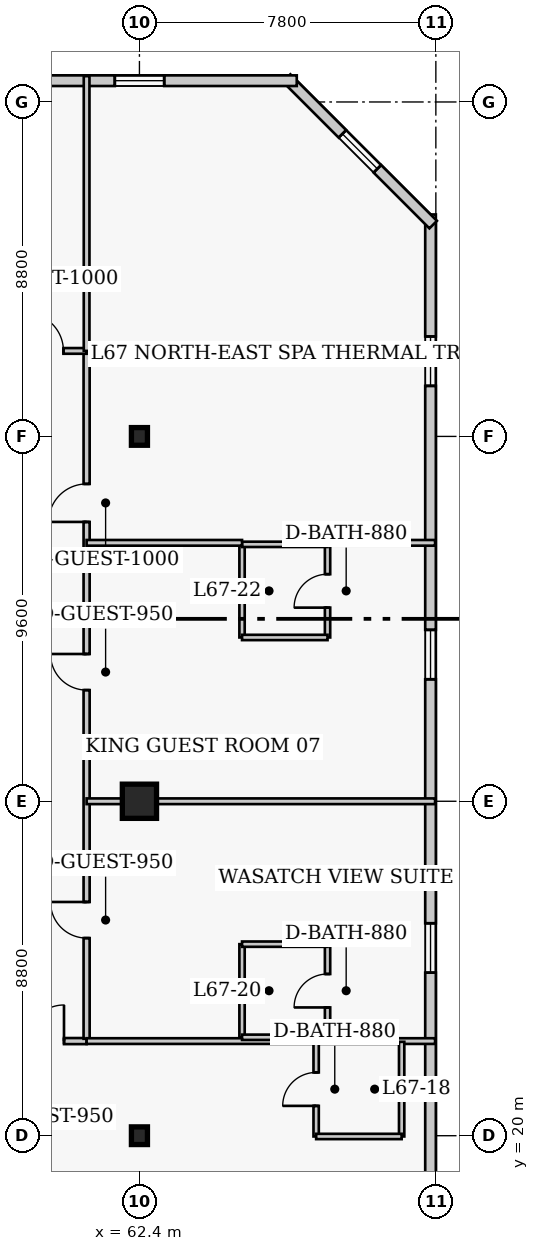
"""IFC4 building model, lengths in metres.
Left out: names, types, materials, properties, quantities, classifications, styles, units other than length and angle.
Written with IfcOpenShell. Run it as: python <this file> out.ifc"""

import sys

from ifc_helpers import new_model, si_unit, direction, frame, frame_2d, origin, origin_2d, place, context, subcontext, project, spatial, rectangle, i_section, extrude, element, fill, save


model = new_model("IFC4")
c1 = context("Model", 3, precision=1e-05, world=origin(), true_north=direction((0.0, 1.0)))
c2 = subcontext(c1, "Body", "Model", "MODEL_VIEW")
j1 = project(units=[si_unit("LENGTHUNIT", "METRE"), si_unit("PLANEANGLEUNIT", "RADIAN")], contexts=[c1])
p1 = place(None, origin())
s1 = spatial("IfcSite", under=j1, at=p1, CompositionType="ELEMENT")
p2 = place(p1, origin())
s2 = spatial("IfcBuilding", under=s1, at=p2, CompositionType="ELEMENT")
p3 = place(p2, frame((0.0, 0.0, 269.4)))
s3 = spatial("IfcBuildingStorey", under=s2, at=p3, CompositionType="ELEMENT", Elevation=269.4)
p4 = place(p3, frame((62.4, 20.0, 0.0), z_axis=(0.0, 0.0, 1.0), x_axis=(1.0, 0.0, 0.0)))
e1 = element("IfcColumn", 1, at=p4, inside=s3, PredefinedType="COLUMN", context=c2, shape_type="SweptSolid", body=[
    extrude(i_section(OverallWidth=0.422, OverallDepth=0.465, WebThickness=0.045, FlangeThickness=0.073, FilletRadius=0.017, at=origin_2d()), origin(), (0.0, 0.0, 1.0), 4.0),
])
p5 = place(p3, frame((62.4, 28.8, 0.0), z_axis=(0.0, 0.0, 1.0), x_axis=(1.0, 0.0, 0.0)))
e2 = element("IfcColumn", 2, at=p5, inside=s3, PredefinedType="COLUMN", context=c2, shape_type="SweptSolid", body=[
    extrude(rectangle(XDim=0.9, YDim=0.9, at=origin_2d()), origin(), (0.0, 0.0, 1.0), 4.0),
])
p6 = place(p3, frame((62.4, 38.4, 0.0), z_axis=(0.0, 0.0, 1.0), x_axis=(1.0, 0.0, 0.0)))
e3 = element("IfcColumn", 3, at=p6, inside=s3, PredefinedType="COLUMN", context=c2, shape_type="SweptSolid", body=[
    extrude(i_section(OverallWidth=0.422, OverallDepth=0.465, WebThickness=0.045, FlangeThickness=0.073, FilletRadius=0.017, at=origin_2d()), origin(), (0.0, 0.0, 1.0), 4.0),
])
p7 = place(p3, frame((70.06, 13.36, 0.0), z_axis=(0.0, 0.0, 1.0), x_axis=(0.0, 1.0, 0.0)))
e4 = element("IfcWall", 4, at=p7, inside=s3, PredefinedType="SOLIDWALL", context=c2, shape_type="SweptSolid", body=[
    extrude(rectangle(XDim=30.88, YDim=0.28, at=frame_2d((15.44, 0.0))), origin(), (0.0, 0.0, 1.0), 3.76),
])
p8 = place(p7, frame((3.21, 0.0, 0.85)))
e5 = element("IfcOpeningElement", 5, at=p8, cuts=e4, PredefinedType="OPENING", context=c2, shape_type="SweptSolid", body=[
    extrude(rectangle(XDim=1.3, YDim=1.7, at=frame_2d((0.65, 0.85))), frame((0.0, 0.15, 0.0), z_axis=(0.0, -1.0, 0.0), x_axis=(1.0, 0.0, 0.0)), (0.0, 0.0, 1.0), 0.3),
])
p9 = place(p7, frame((10.93, 0.0, 0.85)))
e6 = element("IfcOpeningElement", 6, at=p9, cuts=e4, PredefinedType="OPENING", context=c2, shape_type="SweptSolid", body=[
    extrude(rectangle(XDim=1.3, YDim=1.7, at=frame_2d((0.65, 0.85))), frame((0.0, 0.15, 0.0), z_axis=(0.0, -1.0, 0.0), x_axis=(1.0, 0.0, 0.0)), (0.0, 0.0, 1.0), 0.3),
])
p10 = place(p7, frame((18.65, 0.0, 0.85)))
e7 = element("IfcOpeningElement", 7, at=p10, cuts=e4, PredefinedType="OPENING", context=c2, shape_type="SweptSolid", body=[
    extrude(rectangle(XDim=1.3, YDim=1.7, at=frame_2d((0.65, 0.85))), frame((0.0, 0.15, 0.0), z_axis=(0.0, -1.0, 0.0), x_axis=(1.0, 0.0, 0.0)), (0.0, 0.0, 1.0), 0.3),
])
p11 = place(p7, frame((26.37, 0.0, 0.85)))
e8 = element("IfcOpeningElement", 8, at=p11, cuts=e4, PredefinedType="OPENING", context=c2, shape_type="SweptSolid", body=[
    extrude(rectangle(XDim=1.3, YDim=1.7, at=frame_2d((0.65, 0.85))), frame((0.0, 0.15, 0.0), z_axis=(0.0, -1.0, 0.0), x_axis=(1.0, 0.0, 0.0)), (0.0, 0.0, 1.0), 0.3),
])
p12 = place(p3, frame((70.129, 43.973, 0.0), z_axis=(0.0, 0.0, 1.0), x_axis=(-0.707106781187, 0.707106781187, 0.0)))
e9 = element("IfcWall", 9, at=p12, inside=s3, PredefinedType="SOLIDWALL", context=c2, shape_type="SweptSolid", body=[
    extrude(rectangle(XDim=5.454, YDim=0.28, at=frame_2d((2.727, 0.0))), origin(), (0.0, 0.0, 1.0), 3.76),
])
p13 = place(p12, frame((2.077, 0.0, 0.85)))
e10 = element("IfcOpeningElement", 10, at=p13, cuts=e9, PredefinedType="OPENING", context=c2, shape_type="SweptSolid", body=[
    extrude(rectangle(XDim=1.3, YDim=1.7, at=frame_2d((0.65, 0.85))), frame((0.0, 0.15, 0.0), z_axis=(0.0, -1.0, 0.0), x_axis=(1.0, 0.0, 0.0)), (0.0, 0.0, 1.0), 0.3),
])
p14 = place(p3, frame((66.54, 47.76, 0.0), z_axis=(0.0, 0.0, 1.0), x_axis=(-1.0, 0.0, 0.0)))
e11 = element("IfcWall", 11, at=p14, inside=s3, PredefinedType="SOLIDWALL", context=c2, shape_type="SweptSolid", body=[
    extrude(rectangle(XDim=24.83, YDim=0.28, at=frame_2d((12.415, 0.0))), origin(), (0.0, 0.0, 1.0), 3.76),
])
p15 = place(p14, frame((3.488, 0.0, 0.85)))
e12 = element("IfcOpeningElement", 12, at=p15, cuts=e11, PredefinedType="OPENING", context=c2, shape_type="SweptSolid", body=[
    extrude(rectangle(XDim=1.3, YDim=1.7, at=frame_2d((0.65, 0.85))), frame((0.0, 0.15, 0.0), z_axis=(0.0, -1.0, 0.0), x_axis=(1.0, 0.0, 0.0)), (0.0, 0.0, 1.0), 0.3),
])
p16 = place(p14, frame((12.915, 0.0, 0.85)))
e13 = element("IfcOpeningElement", 13, at=p16, cuts=e11, PredefinedType="OPENING", context=c2, shape_type="SweptSolid", body=[
    extrude(rectangle(XDim=1.3, YDim=1.7, at=frame_2d((0.65, 0.85))), frame((0.0, 0.15, 0.0), z_axis=(0.0, -1.0, 0.0), x_axis=(1.0, 0.0, 0.0)), (0.0, 0.0, 1.0), 0.3),
])
p17 = place(p14, frame((20.692, 0.0, 0.85)))
e14 = element("IfcOpeningElement", 14, at=p17, cuts=e11, PredefinedType="OPENING", context=c2, shape_type="SweptSolid", body=[
    extrude(rectangle(XDim=1.3, YDim=1.7, at=frame_2d((0.65, 0.85))), frame((0.0, 0.15, 0.0), z_axis=(0.0, -1.0, 0.0), x_axis=(1.0, 0.0, 0.0)), (0.0, 0.0, 1.0), 0.3),
])
p18 = place(p3, frame((35.8, 22.49, 0.0), z_axis=(0.0, 0.0, 1.0), x_axis=(1.0, 0.0, 0.0)))
e15 = element("IfcWall", 15, at=p18, inside=s3, PredefinedType="PARTITIONING", context=c2, shape_type="SweptSolid", body=[
    extrude(rectangle(XDim=25.21, YDim=0.16, at=frame_2d((12.605, 0.0))), origin(), (0.0, 0.0, 1.0), 3.76),
])
p19 = place(p18, frame((5.522, 0.0, 0.0)))
e16 = element("IfcOpeningElement", 16, at=p19, cuts=e15, PredefinedType="OPENING", context=c2, shape_type="SweptSolid", body=[
    extrude(rectangle(XDim=1.0, YDim=2.15, at=frame_2d((0.5, 1.075))), frame((0.0, 0.09, 0.0), z_axis=(0.0, -1.0, 0.0), x_axis=(1.0, 0.0, 0.0)), (0.0, 0.0, 1.0), 0.18),
])
p20 = place(p18, frame((18.198, 0.0, 0.0)))
e17 = element("IfcOpeningElement", 17, at=p20, cuts=e15, PredefinedType="OPENING", context=c2, shape_type="SweptSolid", body=[
    extrude(rectangle(XDim=0.95, YDim=2.1, at=frame_2d((0.475, 1.05))), frame((0.0, 0.09, 0.0), z_axis=(0.0, -1.0, 0.0), x_axis=(1.0, 0.0, 0.0)), (0.0, 0.0, 1.0), 0.18),
])
p21 = place(p18, frame((23.665, 0.0, 0.0)))
e18 = element("IfcOpeningElement", 18, at=p21, cuts=e15, PredefinedType="OPENING", context=c2, shape_type="SweptSolid", body=[
    extrude(rectangle(XDim=0.95, YDim=2.1, at=frame_2d((0.475, 1.05))), frame((0.0, 0.09, 0.0), z_axis=(0.0, -1.0, 0.0), x_axis=(1.0, 0.0, 0.0)), (0.0, 0.0, 1.0), 0.18),
])
p22 = place(p3, frame((61.01, 22.55, 0.0), z_axis=(0.0, 0.0, 1.0), x_axis=(0.0, 1.0, 0.0)))
e19 = element("IfcWall", 19, at=p22, inside=s3, PredefinedType="PARTITIONING", context=c2, shape_type="SweptSolid", body=[
    extrude(rectangle(XDim=18.1, YDim=0.16, at=frame_2d((9.05, 0.0))), origin(), (0.0, 0.0, 1.0), 3.76),
])
p23 = place(p22, frame((2.65, 0.0, 0.0)))
e20 = element("IfcOpeningElement", 20, at=p23, cuts=e19, PredefinedType="OPENING", context=c2, shape_type="SweptSolid", body=[
    extrude(rectangle(XDim=0.95, YDim=2.1, at=frame_2d((0.475, 1.05))), frame((0.0, 0.09, 0.0), z_axis=(0.0, -1.0, 0.0), x_axis=(1.0, 0.0, 0.0)), (0.0, 0.0, 1.0), 0.18),
])
p24 = place(p22, frame((9.175, 0.0, 0.0)))
e21 = element("IfcOpeningElement", 21, at=p24, cuts=e19, PredefinedType="OPENING", context=c2, shape_type="SweptSolid", body=[
    extrude(rectangle(XDim=0.95, YDim=2.1, at=frame_2d((0.475, 1.05))), frame((0.0, 0.09, 0.0), z_axis=(0.0, -1.0, 0.0), x_axis=(1.0, 0.0, 0.0)), (0.0, 0.0, 1.0), 0.18),
])
p25 = place(p22, frame((13.6, 0.0, 0.0)))
e22 = element("IfcOpeningElement", 22, at=p25, cuts=e19, PredefinedType="OPENING", context=c2, shape_type="SweptSolid", body=[
    extrude(rectangle(XDim=1.0, YDim=2.15, at=frame_2d((0.5, 1.075))), frame((0.0, 0.09, 0.0), z_axis=(0.0, -1.0, 0.0), x_axis=(1.0, 0.0, 0.0)), (0.0, 0.0, 1.0), 0.18),
])
p26 = place(p3, frame((56.8, 40.65, 0.0), z_axis=(0.0, 0.0, 1.0), x_axis=(1.0, 0.0, 0.0)))
e23 = element("IfcWall", 23, at=p26, inside=s3, PredefinedType="PARTITIONING", context=c2, shape_type="SweptSolid", body=[
    extrude(rectangle(XDim=4.21, YDim=0.15, at=frame_2d((2.105, 0.0))), origin(), (0.0, 0.0, 1.0), 3.76),
])
p27 = place(p26, frame((2.6, 0.0, 0.0)))
e24 = element("IfcOpeningElement", 24, at=p27, cuts=e23, PredefinedType="OPENING", context=c2, shape_type="SweptSolid", body=[
    extrude(rectangle(XDim=1.0, YDim=2.15, at=frame_2d((0.5, 1.075))), frame((0.0, 0.085, 0.0), z_axis=(0.0, -1.0, 0.0), x_axis=(1.0, 0.0, 0.0)), (0.0, 0.0, 1.0), 0.17),
])
p28 = place(p3, frame((61.01, 40.65, 0.0), z_axis=(0.0, 0.0, 1.0), x_axis=(0.0, 1.0, 0.0)))
e25 = element("IfcWall", 25, at=p28, inside=s3, PredefinedType="PARTITIONING", context=c2, shape_type="SweptSolid", body=[
    extrude(rectangle(XDim=7.23, YDim=0.15, at=frame_2d((3.615, 0.0))), origin(), (0.0, 0.0, 1.0), 3.76),
])
p29 = place(p3, frame((61.01, 22.49, 0.0), z_axis=(0.0, 0.0, 1.0), x_axis=(1.0, 0.0, 0.0)))
e26 = element("IfcWall", 26, at=p29, inside=s3, PredefinedType="PARTITIONING", context=c2, shape_type="SweptSolid", body=[
    extrude(rectangle(XDim=9.17, YDim=0.15, at=frame_2d((4.585, 0.0))), origin(), (0.0, 0.0, 1.0), 3.76),
])
p30 = place(p3, frame((67.05, 19.98, 0.0), z_axis=(0.0, 0.0, 1.0), x_axis=(0.0, 1.0, 0.0)))
e27 = element("IfcWall", 27, at=p30, inside=s3, PredefinedType="PLUMBINGWALL", context=c2, shape_type="SweptSolid", body=[
    extrude(rectangle(XDim=2.49, YDim=0.14, at=frame_2d((1.245, 0.0))), origin(), (0.0, 0.0, 1.0), 3.76),
])
p31 = place(p30, frame((0.805, 0.0, 0.0)))
e28 = element("IfcOpeningElement", 28, at=p31, cuts=e27, PredefinedType="OPENING", context=c2, shape_type="SweptSolid", body=[
    extrude(rectangle(XDim=0.88, YDim=2.05, at=frame_2d((0.44, 1.025))), frame((0.0, 0.08, 0.0), z_axis=(0.0, -1.0, 0.0), x_axis=(1.0, 0.0, 0.0)), (0.0, 0.0, 1.0), 0.16),
])
p32 = place(p3, frame((69.3, 19.98, 0.0), z_axis=(0.0, 0.0, 1.0), x_axis=(0.0, 1.0, 0.0)))
e29 = element("IfcWall", 29, at=p32, inside=s3, PredefinedType="PLUMBINGWALL", context=c2, shape_type="SweptSolid", body=[
    extrude(rectangle(XDim=2.49, YDim=0.14, at=frame_2d((1.245, 0.0))), origin(), (0.0, 0.0, 1.0), 3.76),
])
p33 = place(p3, frame((67.05, 19.98, 0.0), z_axis=(0.0, 0.0, 1.0), x_axis=(1.0, 0.0, 0.0)))
e30 = element("IfcWall", 30, at=p33, inside=s3, PredefinedType="PLUMBINGWALL", context=c2, shape_type="SweptSolid", body=[
    extrude(rectangle(XDim=2.25, YDim=0.14, at=frame_2d((1.125, 0.0))), origin(), (0.0, 0.0, 1.0), 3.76),
])
p34 = place(p3, frame((65.1, 22.59, 0.0), z_axis=(0.0, 0.0, 1.0), x_axis=(0.0, 1.0, 0.0)))
e31 = element("IfcWall", 31, at=p34, inside=s3, PredefinedType="PLUMBINGWALL", context=c2, shape_type="SweptSolid", body=[
    extrude(rectangle(XDim=2.45, YDim=0.14, at=frame_2d((1.225, 0.0))), origin(), (0.0, 0.0, 1.0), 3.76),
])
p35 = place(p3, frame((67.35, 22.59, 0.0), z_axis=(0.0, 0.0, 1.0), x_axis=(0.0, 1.0, 0.0)))
e32 = element("IfcWall", 32, at=p35, inside=s3, PredefinedType="PLUMBINGWALL", context=c2, shape_type="SweptSolid", body=[
    extrude(rectangle(XDim=2.45, YDim=0.14, at=frame_2d((1.225, 0.0))), origin(), (0.0, 0.0, 1.0), 3.76),
])
p36 = place(p35, frame((0.785, 0.0, 0.0)))
e33 = element("IfcOpeningElement", 33, at=p36, cuts=e32, PredefinedType="OPENING", context=c2, shape_type="SweptSolid", body=[
    extrude(rectangle(XDim=0.88, YDim=2.05, at=frame_2d((0.44, 1.025))), frame((0.0, 0.08, 0.0), z_axis=(0.0, -1.0, 0.0), x_axis=(1.0, 0.0, 0.0)), (0.0, 0.0, 1.0), 0.16),
])
for number, where, z_axis, x_axis in (
    (34, (65.1, 22.59, 0.0), (0.0, 0.0, 1.0), (1.0, 0.0, 0.0)),
    (35, (65.1, 25.04, 0.0), (0.0, 0.0, 1.0), (1.0, 0.0, 0.0)),
):
    element("IfcWall", number, at=place(p3, frame(where, z_axis=z_axis, x_axis=x_axis)), inside=s3, PredefinedType="PLUMBINGWALL", context=c2, shape_type="SweptSolid", body=[
        extrude(rectangle(XDim=2.25, YDim=0.14, at=frame_2d((1.125, 0.0))), origin(), (0.0, 0.0, 1.0), 3.76),
    ])
p37 = place(p3, frame((61.01, 28.8, 0.0), z_axis=(0.0, 0.0, 1.0), x_axis=(1.0, 0.0, 0.0)))
e36 = element("IfcWall", 36, at=p37, inside=s3, PredefinedType="PARTITIONING", context=c2, shape_type="SweptSolid", body=[
    extrude(rectangle(XDim=9.17, YDim=0.15, at=frame_2d((4.585, 0.0))), origin(), (0.0, 0.0, 1.0), 3.064),
])
p38 = place(p3, frame((65.1, 33.11, 0.0), z_axis=(0.0, 0.0, 1.0), x_axis=(0.0, 1.0, 0.0)))
e37 = element("IfcWall", 37, at=p38, inside=s3, PredefinedType="PLUMBINGWALL", context=c2, shape_type="SweptSolid", body=[
    extrude(rectangle(XDim=2.45, YDim=0.14, at=frame_2d((1.225, 0.0))), origin(), (0.0, 0.0, 1.0), 3.76),
])
p39 = place(p3, frame((67.35, 33.11, 0.0), z_axis=(0.0, 0.0, 1.0), x_axis=(0.0, 1.0, 0.0)))
e38 = element("IfcWall", 38, at=p39, inside=s3, PredefinedType="PLUMBINGWALL", context=c2, shape_type="SweptSolid", body=[
    extrude(rectangle(XDim=2.45, YDim=0.14, at=frame_2d((1.225, 0.0))), origin(), (0.0, 0.0, 1.0), 3.76),
])
p40 = place(p39, frame((0.785, 0.0, 0.0)))
e39 = element("IfcOpeningElement", 39, at=p40, cuts=e38, PredefinedType="OPENING", context=c2, shape_type="SweptSolid", body=[
    extrude(rectangle(XDim=0.88, YDim=2.05, at=frame_2d((0.44, 1.025))), frame((0.0, 0.08, 0.0), z_axis=(0.0, -1.0, 0.0), x_axis=(1.0, 0.0, 0.0)), (0.0, 0.0, 1.0), 0.16),
])
for number, where, z_axis, x_axis in (
    (40, (65.1, 33.11, 0.0), (0.0, 0.0, 1.0), (1.0, 0.0, 0.0)),
    (41, (65.1, 35.56, 0.0), (0.0, 0.0, 1.0), (1.0, 0.0, 0.0)),
):
    element("IfcWall", number, at=place(p3, frame(where, z_axis=z_axis, x_axis=x_axis)), inside=s3, PredefinedType="PLUMBINGWALL", context=c2, shape_type="SweptSolid", body=[
        extrude(rectangle(XDim=2.25, YDim=0.14, at=frame_2d((1.125, 0.0))), origin(), (0.0, 0.0, 1.0), 3.76),
    ])
p41 = place(p3, frame((61.01, 35.6, 0.0), z_axis=(0.0, 0.0, 1.0), x_axis=(1.0, 0.0, 0.0)))
e42 = element("IfcWall", 42, at=p41, inside=s3, PredefinedType="PARTITIONING", context=c2, shape_type="SweptSolid", body=[
    extrude(rectangle(XDim=4.09, YDim=0.15, at=frame_2d((2.045, 0.0))), origin(), (0.0, 0.0, 1.0), 3.76),
])
p42 = place(p3, frame((67.35, 35.6, 0.0), z_axis=(0.0, 0.0, 1.0), x_axis=(1.0, 0.0, 0.0)))
e43 = element("IfcWall", 43, at=p42, inside=s3, PredefinedType="PARTITIONING", context=c2, shape_type="SweptSolid", body=[
    extrude(rectangle(XDim=2.83, YDim=0.15, at=frame_2d((1.415, 0.0))), origin(), (0.0, 0.0, 1.0), 3.76),
])
p43 = place(p9, origin())
e44 = element("IfcWindow", 44, at=p43, inside=s3, PartitioningType="SINGLE_PANEL", PredefinedType="WINDOW", context=c2, shape_type="SweptSolid", body=[
    extrude(rectangle(XDim=1.3, YDim=1.7, at=frame_2d((0.65, 0.85))), frame((0.0, 0.03, 0.0), z_axis=(0.0, -1.0, 0.0), x_axis=(1.0, 0.0, 0.0)), (0.0, 0.0, 1.0), 0.06),
])
fill(e6, e44)
p44 = place(p10, origin())
e45 = element("IfcWindow", 45, at=p44, inside=s3, PartitioningType="SINGLE_PANEL", PredefinedType="WINDOW", context=c2, shape_type="SweptSolid", body=[
    extrude(rectangle(XDim=1.3, YDim=1.7, at=frame_2d((0.65, 0.85))), frame((0.0, 0.03, 0.0), z_axis=(0.0, -1.0, 0.0), x_axis=(1.0, 0.0, 0.0)), (0.0, 0.0, 1.0), 0.06),
])
fill(e7, e45)
p45 = place(p11, origin())
e46 = element("IfcWindow", 46, at=p45, inside=s3, PartitioningType="SINGLE_PANEL", PredefinedType="WINDOW", context=c2, shape_type="SweptSolid", body=[
    extrude(rectangle(XDim=1.3, YDim=1.7, at=frame_2d((0.65, 0.85))), frame((0.0, 0.03, 0.0), z_axis=(0.0, -1.0, 0.0), x_axis=(1.0, 0.0, 0.0)), (0.0, 0.0, 1.0), 0.06),
])
fill(e8, e46)
p46 = place(p13, origin())
e47 = element("IfcWindow", 47, at=p46, inside=s3, PartitioningType="SINGLE_PANEL", PredefinedType="WINDOW", context=c2, shape_type="SweptSolid", body=[
    extrude(rectangle(XDim=1.3, YDim=1.7, at=frame_2d((0.65, 0.85))), frame((0.0, 0.03, 0.0), z_axis=(0.0, -1.0, 0.0), x_axis=(1.0, 0.0, 0.0)), (0.0, 0.0, 1.0), 0.06),
])
fill(e10, e47)
p47 = place(p15, origin())
e48 = element("IfcWindow", 48, at=p47, inside=s3, PartitioningType="SINGLE_PANEL", PredefinedType="WINDOW", context=c2, shape_type="SweptSolid", body=[
    extrude(rectangle(XDim=1.3, YDim=1.7, at=frame_2d((0.65, 0.85))), frame((0.0, 0.03, 0.0), z_axis=(0.0, -1.0, 0.0), x_axis=(1.0, 0.0, 0.0)), (0.0, 0.0, 1.0), 0.06),
])
fill(e12, e48)
p48 = place(p27, origin())
e49 = element("IfcDoor", 49, at=p48, inside=s3, OperationType="SINGLE_SWING_LEFT", PredefinedType="DOOR", context=c2, shape_type="SweptSolid", body=[
    extrude(rectangle(XDim=1.0, YDim=2.15, at=frame_2d((0.5, 1.075))), frame((0.0, 0.025, 0.0), z_axis=(0.0, -1.0, 0.0), x_axis=(1.0, 0.0, 0.0)), (0.0, 0.0, 1.0), 0.05),
])
fill(e24, e49)
p49 = place(p31, origin())
e50 = element("IfcDoor", 50, at=p49, inside=s3, OperationType="SINGLE_SWING_LEFT", PredefinedType="DOOR", context=c2, shape_type="SweptSolid", body=[
    extrude(rectangle(XDim=0.88, YDim=2.05, at=frame_2d((0.44, 1.025))), frame((0.0, 0.025, 0.0), z_axis=(0.0, -1.0, 0.0), x_axis=(1.0, 0.0, 0.0)), (0.0, 0.0, 1.0), 0.05),
])
fill(e28, e50)
p50 = place(p21, origin())
e51 = element("IfcDoor", 51, at=p50, inside=s3, OperationType="SINGLE_SWING_RIGHT", PredefinedType="DOOR", context=c2, shape_type="SweptSolid", body=[
    extrude(rectangle(XDim=0.95, YDim=2.1, at=frame_2d((0.475, 1.05))), frame((0.0, 0.025, 0.0), z_axis=(0.0, -1.0, 0.0), x_axis=(1.0, 0.0, 0.0)), (0.0, 0.0, 1.0), 0.05),
])
fill(e18, e51)
p51 = place(p36, origin())
e52 = element("IfcDoor", 52, at=p51, inside=s3, OperationType="SINGLE_SWING_LEFT", PredefinedType="DOOR", context=c2, shape_type="SweptSolid", body=[
    extrude(rectangle(XDim=0.88, YDim=2.05, at=frame_2d((0.44, 1.025))), frame((0.0, 0.025, 0.0), z_axis=(0.0, -1.0, 0.0), x_axis=(1.0, 0.0, 0.0)), (0.0, 0.0, 1.0), 0.05),
])
fill(e33, e52)
p52 = place(p23, origin())
e53 = element("IfcDoor", 53, at=p52, inside=s3, OperationType="SINGLE_SWING_RIGHT", PredefinedType="DOOR", context=c2, shape_type="SweptSolid", body=[
    extrude(rectangle(XDim=0.95, YDim=2.1, at=frame_2d((0.475, 1.05))), frame((0.0, 0.025, 0.0), z_axis=(0.0, -1.0, 0.0), x_axis=(1.0, 0.0, 0.0)), (0.0, 0.0, 1.0), 0.05),
])
fill(e20, e53)
p53 = place(p40, origin())
e54 = element("IfcDoor", 54, at=p53, inside=s3, OperationType="SINGLE_SWING_LEFT", PredefinedType="DOOR", context=c2, shape_type="SweptSolid", body=[
    extrude(rectangle(XDim=0.88, YDim=2.05, at=frame_2d((0.44, 1.025))), frame((0.0, 0.025, 0.0), z_axis=(0.0, -1.0, 0.0), x_axis=(1.0, 0.0, 0.0)), (0.0, 0.0, 1.0), 0.05),
])
fill(e39, e54)
p54 = place(p24, origin())
e55 = element("IfcDoor", 55, at=p54, inside=s3, OperationType="SINGLE_SWING_RIGHT", PredefinedType="DOOR", context=c2, shape_type="SweptSolid", body=[
    extrude(rectangle(XDim=0.95, YDim=2.1, at=frame_2d((0.475, 1.05))), frame((0.0, 0.025, 0.0), z_axis=(0.0, -1.0, 0.0), x_axis=(1.0, 0.0, 0.0)), (0.0, 0.0, 1.0), 0.05),
])
fill(e21, e55)
p55 = place(p25, origin())
e56 = element("IfcDoor", 56, at=p55, inside=s3, OperationType="SINGLE_SWING_LEFT", PredefinedType="DOOR", context=c2, shape_type="SweptSolid", body=[
    extrude(rectangle(XDim=1.0, YDim=2.15, at=frame_2d((0.5, 1.075))), frame((0.0, 0.025, 0.0), z_axis=(0.0, -1.0, 0.0), x_axis=(1.0, 0.0, 0.0)), (0.0, 0.0, 1.0), 0.05),
])
fill(e22, e56)
save(model, sys.argv[1])
